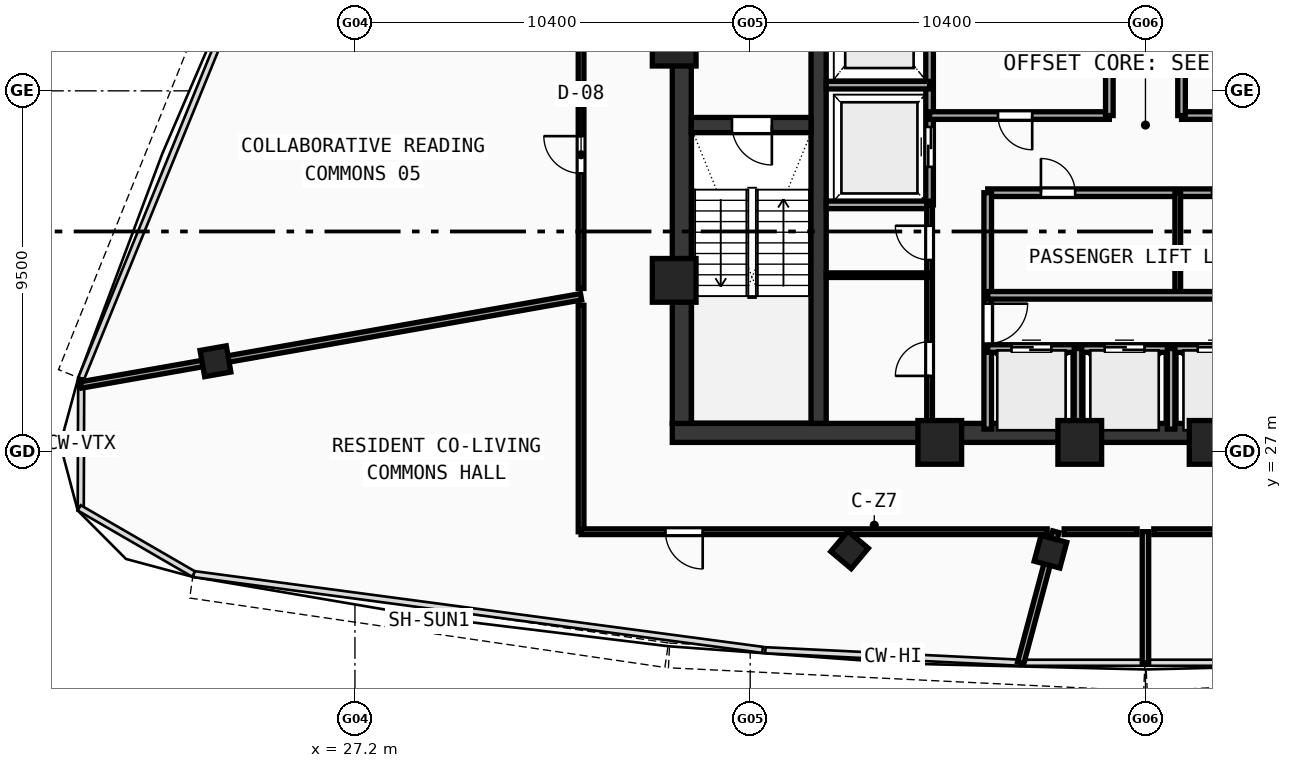
"""IFC4 building model, lengths in metres.
Left out: names, types, materials, properties, quantities, classifications, styles, units other than length and angle.
Written with IfcOpenShell. Run it as: python <this file> out.ifc"""

import sys

from ifc_helpers import new_model, si_unit, direction, frame, frame_2d, origin, origin_with_axes, origin_2d, place, context, subcontext, project, spatial, rectangle, hollow_rectangle, extrude, source, transform, mapped, element, fill, save


model = new_model("IFC4")
c1 = context("Model", 3, precision=1e-05, world=origin(), true_north=direction((0.0, 1.0)))
c2 = subcontext(c1, "Body", "Model", "MODEL_VIEW")
j1 = project(units=[si_unit("LENGTHUNIT", "METRE"), si_unit("PLANEANGLEUNIT", "RADIAN")], contexts=[c1])
p1 = place(None, origin())
s1 = spatial("IfcSite", under=j1, at=p1, CompositionType="ELEMENT")
p2 = place(p1, origin())
s2 = spatial("IfcBuilding", under=s1, at=p2, CompositionType="ELEMENT")
p3 = place(p2, frame((0.0, 0.0, 336.76)))
s3 = spatial("IfcBuildingStorey", under=s2, at=p3, CompositionType="ELEMENT", Elevation=336.76)
p4 = place(p3, frame((35.55, 27.5, 0.0), z_axis=(0.0, 0.0, 1.0), x_axis=(1.0, 0.0, 0.0)))
e1 = element("IfcWall", 1, at=p4, inside=s3, PredefinedType="SHEAR", context=c2, shape_type="SweptSolid", body=[
    extrude(rectangle(XDim=24.9, YDim=0.5, at=frame_2d((12.45, 0.0))), origin(), (0.0, 0.0, 1.0), 3.49),
])
p5 = place(p3, frame((35.8, 27.75, 0.0), z_axis=(0.0, 0.0, 1.0), x_axis=(0.0, 1.0, 0.0)))
e2 = element("IfcWall", 2, at=p5, inside=s3, PredefinedType="SHEAR", context=c2, shape_type="SweptSolid", body=[
    extrude(rectangle(XDim=12.2, YDim=0.5, at=frame_2d((6.1, 0.0))), origin(), (0.0, 0.0, 1.0), 3.49),
])
p6 = place(p3, frame((39.4, 27.75, 0.0), z_axis=(0.0, 0.0, 1.0), x_axis=(0.0, 1.0, 0.0)))
e3 = element("IfcWall", 3, at=p6, inside=s3, PredefinedType="SHEAR", context=c2, shape_type="SweptSolid", body=[
    extrude(rectangle(XDim=12.2, YDim=0.4, at=frame_2d((6.1, 0.0))), origin(), (0.0, 0.0, 1.0), 3.49),
])
p7 = place(p6, frame((10.0, 0.0, 0.0)))
e4 = element("IfcOpeningElement", 4, at=p7, cuts=e3, PredefinedType="OPENING", context=c2, shape_type="SweptSolid", body=[
    extrude(rectangle(XDim=1.1, YDim=2.1, at=frame_2d((0.55, 1.05))), frame((0.0, 0.21, 0.0), z_axis=(0.0, -1.0, 0.0), x_axis=(1.0, 0.0, 0.0)), (0.0, 0.0, 1.0), 0.42),
])
p8 = place(p3, frame((36.05, 35.6, 0.0), z_axis=(0.0, 0.0, 1.0), x_axis=(1.0, 0.0, 0.0)))
e5 = element("IfcWall", 5, at=p8, inside=s3, PredefinedType="SHEAR", context=c2, shape_type="SweptSolid", body=[
    extrude(rectangle(XDim=3.15, YDim=0.4, at=frame_2d((1.575, 0.0))), origin(), (0.0, 0.0, 1.0), 3.49),
])
p9 = place(p8, frame((1.07, 0.0, 0.0)))
e6 = element("IfcOpeningElement", 6, at=p9, cuts=e5, PredefinedType="OPENING", context=c2, shape_type="SweptSolid", body=[
    extrude(rectangle(XDim=1.05, YDim=2.1, at=frame_2d((0.525, 1.05))), frame((0.0, 0.21, 0.0), z_axis=(0.0, -1.0, 0.0), x_axis=(1.0, 0.0, 0.0)), (0.0, 0.0, 1.0), 0.42),
])
m1 = source(origin(), c2, "Body", "SweptSolid", [
    extrude(hollow_rectangle(XDim=1.15, YDim=1.15, WallThickness=0.048, at=origin_2d()), origin(), (0.0, 0.0, 1.0), 3.75),
])
for number, where, z_axis, x_axis in (
    (7, (42.588, 27.25, -0.26), (0.0, 0.0, 1.0), (1.0, 0.0, 0.0)),
    (8, (46.272, 27.25, -0.26), (0.0, 0.0, 1.0), (1.0, 0.0, 0.0)),
    (9, (49.729, 27.25, -0.26), (0.0, 0.0, 1.0), (1.0, 0.0, 0.0)),
    (10, (35.6, 37.729, -0.26), (0.0, 0.0, 1.0), (1.0, 0.0, 0.0)),
    (11, (35.6, 31.513, -0.26), (0.0, 0.0, 1.0), (1.0, 0.0, 0.0)),
):
    element("IfcColumn", number, at=place(p3, frame(where, z_axis=z_axis, x_axis=x_axis)), inside=s3, PredefinedType="COLUMN", context=c2, shape_type="MappedRepresentation", body=[
        mapped(m1, transform((0.0, 0.0, 0.0), scale=1.0)),
    ])
m2 = source(origin(), c2, "Body", "SweptSolid", [
    extrude(hollow_rectangle(XDim=0.7, YDim=0.7, WallThickness=0.026, at=origin_2d()), origin(), (0.0, 0.0, 1.0), 3.75),
])
for number, where, z_axis, x_axis in (
    (12, (40.215, 24.422, -0.26), (0.0, 0.0, 1.0), (0.766, -0.643, 0.0)),
    (13, (45.501, 24.373, -0.26), (0.0, 0.0, 1.0), (0.966, -0.259, 0.0)),
    (14, (23.53, 29.385, -0.26), (0.0, 0.0, 1.0), (0.174, -0.985, 0.0)),
):
    element("IfcColumn", number, at=place(p3, frame(where, z_axis=z_axis, x_axis=x_axis)), inside=s3, PredefinedType="COLUMN", context=c2, shape_type="MappedRepresentation", body=[
        mapped(m2, transform((0.0, 0.0, 0.0), scale=1.0)),
    ])
p10 = place(p3, frame((42.32, 33.5, 0.0), z_axis=(0.0, 0.0, 1.0), x_axis=(0.0, 1.0, 0.0)))
e15 = element("IfcWall", 15, at=p10, inside=s3, PredefinedType="SOLIDWALL", context=c2, shape_type="SweptSolid", body=[
    extrude(rectangle(XDim=6.45, YDim=0.2, at=frame_2d((3.225, 0.0))), origin(), (0.0, 0.0, 1.0), 3.49),
])
p11 = place(p10, frame((1.0, 0.0, 0.0)))
e16 = element("IfcOpeningElement", 16, at=p11, cuts=e15, PredefinedType="OPENING", context=c2, shape_type="SweptSolid", body=[
    extrude(rectangle(XDim=1.05, YDim=2.1, at=frame_2d((0.525, 1.05))), frame((0.0, 0.11, 0.0), z_axis=(0.0, -1.0, 0.0), x_axis=(1.0, 0.0, 0.0)), (0.0, 0.0, 1.0), 0.22),
])
for number, where, z_axis, x_axis in (
    (17, (39.6, 36.65, 0.0), (0.0, 0.0, 1.0), (1.0, 0.0, 0.0)),
    (18, (39.6, 33.5, 0.0), (0.0, 0.0, 1.0), (1.0, 0.0, 0.0)),
):
    element("IfcWall", number, at=place(p3, frame(where, z_axis=z_axis, x_axis=x_axis)), inside=s3, PredefinedType="SOLIDWALL", context=c2, shape_type="SweptSolid", body=[
        extrude(rectangle(XDim=2.72, YDim=0.2, at=frame_2d((1.36, 0.0))), origin(), (0.0, 0.0, 1.0), 3.49),
    ])
p12 = place(p3, frame((42.32, 35.85, 0.0), z_axis=(0.0, 0.0, 1.0), x_axis=(1.0, 0.0, 0.0)))
e19 = element("IfcWall", 19, at=p12, inside=s3, PredefinedType="SOLIDWALL", context=c2, shape_type="SweptSolid", body=[
    extrude(rectangle(XDim=4.73, YDim=0.2, at=frame_2d((2.365, 0.0))), origin(), (0.0, 0.0, 1.0), 3.49),
])
p13 = place(p12, frame((1.8, 0.0, 0.0)))
e20 = element("IfcOpeningElement", 20, at=p13, cuts=e19, PredefinedType="OPENING", context=c2, shape_type="SweptSolid", body=[
    extrude(rectangle(XDim=0.9, YDim=2.1, at=frame_2d((0.45, 1.05))), frame((0.0, 0.11, 0.0), z_axis=(0.0, -1.0, 0.0), x_axis=(1.0, 0.0, 0.0)), (0.0, 0.0, 1.0), 0.22),
])
p14 = place(p3, frame((48.95, 35.85, 0.0), z_axis=(0.0, 0.0, 1.0), x_axis=(1.0, 0.0, 0.0)))
e21 = element("IfcWall", 21, at=p14, inside=s3, PredefinedType="SOLIDWALL", context=c2, shape_type="SweptSolid", body=[
    extrude(rectangle(XDim=4.73, YDim=0.2, at=frame_2d((2.365, 0.0))), origin(), (0.0, 0.0, 1.0), 3.49),
])
p15 = place(p14, frame((1.8, 0.0, 0.0)))
e22 = element("IfcOpeningElement", 22, at=p15, cuts=e21, PredefinedType="OPENING", context=c2, shape_type="SweptSolid", body=[
    extrude(rectangle(XDim=0.9, YDim=2.1, at=frame_2d((0.45, 1.05))), frame((0.0, 0.11, 0.0), z_axis=(0.0, -1.0, 0.0), x_axis=(1.0, 0.0, 0.0)), (0.0, 0.0, 1.0), 0.22),
])
for number, where, z_axis, x_axis in (
    (23, (47.05, 35.85, 0.0), (0.0, 0.0, 1.0), (0.0, 1.0, 0.0)),
    (24, (48.95, 35.85, 0.0), (0.0, 0.0, 1.0), (0.0, 1.0, 0.0)),
):
    element("IfcWall", number, at=place(p3, frame(where, z_axis=z_axis, x_axis=x_axis)), inside=s3, PredefinedType="SOLIDWALL", context=c2, shape_type="SweptSolid", body=[
        extrude(rectangle(XDim=4.1, YDim=0.2, at=frame_2d((2.05, 0.0))), origin(), (0.0, 0.0, 1.0), 3.49),
    ])
p16 = place(p3, frame((43.85, 33.82, 0.0), z_axis=(0.0, 0.0, 1.0), x_axis=(1.0, 0.0, 0.0)))
e25 = element("IfcWall", 25, at=p16, inside=s3, PredefinedType="SOLIDWALL", context=c2, shape_type="SweptSolid", body=[
    extrude(rectangle(XDim=9.83, YDim=0.2, at=frame_2d((4.915, 0.0))), origin(), (0.0, 0.0, 1.0), 3.49),
])
p17 = place(p16, frame((1.4, 0.0, 0.0)))
e26 = element("IfcOpeningElement", 26, at=p17, cuts=e25, PredefinedType="OPENING", context=c2, shape_type="SweptSolid", body=[
    extrude(rectangle(XDim=0.9, YDim=2.1, at=frame_2d((0.45, 1.05))), frame((0.0, 0.11, 0.0), z_axis=(0.0, -1.0, 0.0), x_axis=(1.0, 0.0, 0.0)), (0.0, 0.0, 1.0), 0.22),
])
p18 = place(p16, frame((5.9, 0.0, 0.0)))
e27 = element("IfcOpeningElement", 27, at=p18, cuts=e25, PredefinedType="OPENING", context=c2, shape_type="SweptSolid", body=[
    extrude(rectangle(XDim=0.9, YDim=2.1, at=frame_2d((0.45, 1.05))), frame((0.0, 0.11, 0.0), z_axis=(0.0, -1.0, 0.0), x_axis=(1.0, 0.0, 0.0)), (0.0, 0.0, 1.0), 0.22),
])
p19 = place(p3, frame((43.85, 27.6, 0.0), z_axis=(0.0, 0.0, 1.0), x_axis=(0.0, 1.0, 0.0)))
e28 = element("IfcWall", 28, at=p19, inside=s3, PredefinedType="SOLIDWALL", context=c2, shape_type="SweptSolid", body=[
    extrude(rectangle(XDim=6.22, YDim=0.2, at=frame_2d((3.11, 0.0))), origin(), (0.0, 0.0, 1.0), 3.49),
])
p20 = place(p19, frame((2.25, 0.0, 0.0)))
e29 = element("IfcOpeningElement", 29, at=p20, cuts=e28, PredefinedType="OPENING", context=c2, shape_type="SweptSolid", body=[
    extrude(rectangle(XDim=1.05, YDim=2.1, at=frame_2d((0.525, 1.05))), frame((0.0, 0.11, 0.0), z_axis=(0.0, -1.0, 0.0), x_axis=(1.0, 0.0, 0.0)), (0.0, 0.0, 1.0), 0.22),
])
p21 = place(p3, frame((48.85, 31.12, 0.0), z_axis=(0.0, 0.0, 1.0), x_axis=(0.0, 1.0, 0.0)))
e30 = element("IfcWall", 30, at=p21, inside=s3, PredefinedType="PARTITIONING", context=c2, shape_type="SweptSolid", body=[
    extrude(rectangle(XDim=2.7, YDim=0.15, at=frame_2d((1.35, 0.0))), origin(), (0.0, 0.0, 1.0), 3.49),
])
p22 = place(p3, frame((43.85, 29.72, 0.0), z_axis=(0.0, 0.0, 1.0), x_axis=(1.0, 0.0, 0.0)))
e31 = element("IfcWall", 31, at=p22, inside=s3, PredefinedType="SOLIDWALL", context=c2, shape_type="SweptSolid", body=[
    extrude(rectangle(XDim=7.2, YDim=0.2, at=frame_2d((3.6, 0.0))), origin(), (0.0, 0.0, 1.0), 3.49),
])
p23 = place(p22, frame((0.625, 0.0, 0.0)))
e32 = element("IfcOpeningElement", 32, at=p23, cuts=e31, PredefinedType="OPENING", context=c2, shape_type="SweptSolid", body=[
    extrude(rectangle(XDim=1.05, YDim=2.1, at=frame_2d((0.525, 1.05))), frame((0.0, 0.11, 0.0), z_axis=(0.0, -1.0, 0.0), x_axis=(1.0, 0.0, 0.0)), (0.0, 0.0, 1.0), 0.22),
])
p24 = place(p22, frame((3.075, 0.0, 0.0)))
e33 = element("IfcOpeningElement", 33, at=p24, cuts=e31, PredefinedType="OPENING", context=c2, shape_type="SweptSolid", body=[
    extrude(rectangle(XDim=1.05, YDim=2.1, at=frame_2d((0.525, 1.05))), frame((0.0, 0.11, 0.0), z_axis=(0.0, -1.0, 0.0), x_axis=(1.0, 0.0, 0.0)), (0.0, 0.0, 1.0), 0.22),
])
p25 = place(p22, frame((5.525, 0.0, 0.0)))
e34 = element("IfcOpeningElement", 34, at=p25, cuts=e31, PredefinedType="OPENING", context=c2, shape_type="SweptSolid", body=[
    extrude(rectangle(XDim=1.05, YDim=2.1, at=frame_2d((0.525, 1.05))), frame((0.0, 0.11, 0.0), z_axis=(0.0, -1.0, 0.0), x_axis=(1.0, 0.0, 0.0)), (0.0, 0.0, 1.0), 0.22),
])
p26 = place(p3, frame((43.85, 31.12, 0.0), z_axis=(0.0, 0.0, 1.0), x_axis=(1.0, 0.0, 0.0)))
e35 = element("IfcWall", 35, at=p26, inside=s3, PredefinedType="SOLIDWALL", context=c2, shape_type="SweptSolid", body=[
    extrude(rectangle(XDim=9.83, YDim=0.2, at=frame_2d((4.915, 0.0))), origin(), (0.0, 0.0, 1.0), 3.49),
])
for number, where, z_axis, x_axis in (
    (36, (46.225, 27.6, 0.0), (0.0, 0.0, 1.0), (0.0, 1.0, 0.0)),
    (37, (48.675, 27.6, 0.0), (0.0, 0.0, 1.0), (0.0, 1.0, 0.0)),
):
    element("IfcWall", number, at=place(p3, frame(where, z_axis=z_axis, x_axis=x_axis)), inside=s3, PredefinedType="SOLIDWALL", context=c2, shape_type="SweptSolid", body=[
        extrude(rectangle(XDim=2.12, YDim=0.2, at=frame_2d((1.06, 0.0))), origin(), (0.0, 0.0, 1.0), 3.49),
    ])
p27 = place(p3, frame((42.32, 27.6, 0.0), z_axis=(0.0, 0.0, 1.0), x_axis=(0.0, 1.0, 0.0)))
e38 = element("IfcWall", 38, at=p27, inside=s3, PredefinedType="PARTITIONING", context=c2, shape_type="SweptSolid", body=[
    extrude(rectangle(XDim=5.9, YDim=0.15, at=frame_2d((2.95, 0.0))), origin(), (0.0, 0.0, 1.0), 3.49),
])
p28 = place(p27, frame((1.4, 0.0, 0.0)))
e39 = element("IfcOpeningElement", 39, at=p28, cuts=e38, PredefinedType="OPENING", context=c2, shape_type="SweptSolid", body=[
    extrude(rectangle(XDim=0.9, YDim=2.1, at=frame_2d((0.45, 1.05))), frame((0.0, 0.085, 0.0), z_axis=(0.0, -1.0, 0.0), x_axis=(1.0, 0.0, 0.0)), (0.0, 0.0, 1.0), 0.17),
])
p29 = place(p27, frame((4.45, 0.0, 0.0)))
e40 = element("IfcOpeningElement", 40, at=p29, cuts=e38, PredefinedType="OPENING", context=c2, shape_type="SweptSolid", body=[
    extrude(rectangle(XDim=0.9, YDim=2.1, at=frame_2d((0.45, 1.05))), frame((0.0, 0.085, 0.0), z_axis=(0.0, -1.0, 0.0), x_axis=(1.0, 0.0, 0.0)), (0.0, 0.0, 1.0), 0.17),
])
p30 = place(p3, frame((39.6, 31.65, 0.0), z_axis=(0.0, 0.0, 1.0), x_axis=(1.0, 0.0, 0.0)))
e41 = element("IfcWall", 41, at=p30, inside=s3, PredefinedType="PARTITIONING", context=c2, shape_type="SweptSolid", body=[
    extrude(rectangle(XDim=2.72, YDim=0.12, at=frame_2d((1.36, 0.0))), origin(), (0.0, 0.0, 1.0), 3.49),
])
p31 = place(p3, frame((33.15, 31.082, 0.0), z_axis=(0.0, 0.0, 1.0), x_axis=(-0.984808938627, -0.173641453575, 0.0)))
e42 = element("IfcWall", 42, at=p31, inside=s3, PredefinedType="PARTITIONING", context=c2, shape_type="SweptSolid", body=[
    extrude(rectangle(XDim=13.358, YDim=0.17, at=frame_2d((6.679, 0.0))), origin(), (0.0, 0.0, 1.0), 2.89),
])
p32 = place(p3, frame((45.642, 24.9, 0.0), z_axis=(0.0, 0.0, 1.0), x_axis=(-0.258837518281, -0.965920876227, 0.0)))
e43 = element("IfcWall", 43, at=p32, inside=s3, PredefinedType="PARTITIONING", context=c2, shape_type="SweptSolid", body=[
    extrude(rectangle(XDim=3.569, YDim=0.17, at=frame_2d((1.785, 0.0))), origin(), (0.0, 0.0, 1.0), 2.89),
])
p33 = place(p3, frame((48.0, 24.9, 0.0), z_axis=(0.0, 0.0, 1.0), x_axis=(0.0, -1.0, 0.0)))
e44 = element("IfcWall", 44, at=p33, inside=s3, PredefinedType="PARTITIONING", context=c2, shape_type="SweptSolid", body=[
    extrude(rectangle(XDim=3.448, YDim=0.17, at=frame_2d((1.724, 0.0))), origin(), (0.0, 0.0, 1.0), 2.89),
])
p34 = place(p3, frame((33.15, 24.9, 0.0), z_axis=(0.0, 0.0, 1.0), x_axis=(0.0, 1.0, 0.0)))
e45 = element("IfcWall", 45, at=p34, inside=s3, PredefinedType="PARTITIONING", context=c2, shape_type="SweptSolid", body=[
    extrude(rectangle(XDim=5.958, YDim=0.15, at=frame_2d((2.979, 0.0))), origin(), (0.0, 0.0, 1.0), 2.89),
])
p35 = place(p3, frame((33.15, 31.301, 0.0), z_axis=(0.0, 0.0, 1.0), x_axis=(0.0, 1.0, 0.0)))
e46 = element("IfcWall", 46, at=p35, inside=s3, PredefinedType="PARTITIONING", context=c2, shape_type="SweptSolid", body=[
    extrude(rectangle(XDim=7.004, YDim=0.15, at=frame_2d((3.502, 0.0))), origin(), (0.0, 0.0, 1.0), 3.49),
])
p36 = place(p35, frame((3.027, 0.0, 0.0)))
e47 = element("IfcOpeningElement", 47, at=p36, cuts=e46, PredefinedType="OPENING", context=c2, shape_type="SweptSolid", body=[
    extrude(rectangle(XDim=0.98, YDim=2.12, at=frame_2d((0.49, 1.06))), frame((0.0, 0.085, 0.0), z_axis=(0.0, -1.0, 0.0), x_axis=(1.0, 0.0, 0.0)), (0.0, 0.0, 1.0), 0.17),
])
for number, where, z_axis, x_axis in (
    (48, (50.138, 24.9, 0.0), (0.0, 0.0, 1.0), (-1.0, 0.0, 0.0)),
    (49, (47.78, 24.9, 0.0), (0.0, 0.0, 1.0), (-1.0, 0.0, 0.0)),
):
    element("IfcWall", number, at=place(p3, frame(where, z_axis=z_axis, x_axis=x_axis)), inside=s3, PredefinedType="PARTITIONING", context=c2, shape_type="SweptSolid", body=[
        extrude(rectangle(XDim=1.918, YDim=0.15, at=frame_2d((0.959, 0.0))), origin(), (0.0, 0.0, 1.0), 3.49),
    ])
p37 = place(p3, frame((45.414, 24.9, 0.0), z_axis=(0.0, 0.0, 1.0), x_axis=(-1.0, 0.0, 0.0)))
e50 = element("IfcWall", 50, at=p37, inside=s3, PredefinedType="PARTITIONING", context=c2, shape_type="SweptSolid", body=[
    extrude(rectangle(XDim=12.264, YDim=0.15, at=frame_2d((6.132, 0.0))), origin(), (0.0, 0.0, 1.0), 2.89),
])
p38 = place(p37, frame((9.064, 0.0, 0.0)))
e51 = element("IfcOpeningElement", 51, at=p38, cuts=e50, PredefinedType="OPENING", context=c2, shape_type="SweptSolid", body=[
    extrude(rectangle(XDim=0.98, YDim=2.12, at=frame_2d((0.49, 1.06))), frame((0.0, 0.085, 0.0), z_axis=(0.0, -1.0, 0.0), x_axis=(1.0, 0.0, 0.0)), (0.0, 0.0, 1.0), 0.17),
])
m3 = source(origin(), c2, "Body", "SweptSolid", [
    extrude(rectangle(XDim=1.05, YDim=2.1, at=frame_2d((0.525, 1.05))), frame((0.0, 0.025, 0.0), z_axis=(0.0, -1.0, 0.0), x_axis=(1.0, 0.0, 0.0)), (0.0, 0.0, 1.0), 0.05),
])
p39 = place(p9, frame((1.05, 0.0, 0.0), z_axis=(0.0, 0.0, 1.0), x_axis=(-1.0, 0.0, 0.0)))
e52 = element("IfcDoor", 52, at=p39, inside=s3, OperationType="SINGLE_SWING_LEFT", PredefinedType="DOOR", context=c2, shape_type="MappedRepresentation", body=[
    mapped(m3, transform((0.0, 0.0, 0.0), scale=1.0)),
])
fill(e6, e52)
p40 = place(p11, origin_with_axes())
e53 = element("IfcDoor", 53, at=p40, inside=s3, OperationType="DOUBLE_DOOR_SLIDING", PredefinedType="DOOR", context=c2, shape_type="MappedRepresentation", body=[
    mapped(m3, transform((0.0, 0.0, 0.0), scale=1.0)),
])
fill(e16, e53)
m4 = source(origin(), c2, "Body", "SweptSolid", [
    extrude(rectangle(XDim=0.9, YDim=2.1, at=frame_2d((0.45, 1.05))), frame((0.0, 0.025, 0.0), z_axis=(0.0, -1.0, 0.0), x_axis=(1.0, 0.0, 0.0)), (0.0, 0.0, 1.0), 0.05),
])
p41 = place(p13, frame((0.9, 0.0, 0.0), z_axis=(0.0, 0.0, 1.0), x_axis=(-1.0, 0.0, 0.0)))
e54 = element("IfcDoor", 54, at=p41, inside=s3, OperationType="SINGLE_SWING_LEFT", PredefinedType="DOOR", context=c2, shape_type="MappedRepresentation", body=[
    mapped(m4, transform((0.0, 0.0, 0.0), scale=1.0)),
])
fill(e20, e54)
p42 = place(p17, origin_with_axes())
e55 = element("IfcDoor", 55, at=p42, inside=s3, OperationType="SINGLE_SWING_LEFT", PredefinedType="DOOR", context=c2, shape_type="MappedRepresentation", body=[
    mapped(m4, transform((0.0, 0.0, 0.0), scale=1.0)),
])
fill(e26, e55)
p43 = place(p18, origin_with_axes())
e56 = element("IfcDoor", 56, at=p43, inside=s3, OperationType="SINGLE_SWING_RIGHT", PredefinedType="DOOR", context=c2, shape_type="MappedRepresentation", body=[
    mapped(m4, transform((0.0, 0.0, 0.0), scale=1.0)),
])
fill(e27, e56)
p44 = place(p20, frame((1.05, 0.0, 0.0), z_axis=(0.0, 0.0, 1.0), x_axis=(-1.0, 0.0, 0.0)))
e57 = element("IfcDoor", 57, at=p44, inside=s3, OperationType="SINGLE_SWING_LEFT", PredefinedType="DOOR", context=c2, shape_type="MappedRepresentation", body=[
    mapped(m3, transform((0.0, 0.0, 0.0), scale=1.0)),
])
fill(e29, e57)
p45 = place(p23, origin_with_axes())
e58 = element("IfcDoor", 58, at=p45, inside=s3, OperationType="DOUBLE_DOOR_SLIDING", PredefinedType="DOOR", context=c2, shape_type="MappedRepresentation", body=[
    mapped(m3, transform((0.0, 0.0, 0.0), scale=1.0)),
])
fill(e32, e58)
p46 = place(p24, origin_with_axes())
e59 = element("IfcDoor", 59, at=p46, inside=s3, OperationType="DOUBLE_DOOR_SLIDING", PredefinedType="DOOR", context=c2, shape_type="MappedRepresentation", body=[
    mapped(m3, transform((0.0, 0.0, 0.0), scale=1.0)),
])
fill(e33, e59)
p47 = place(p25, origin_with_axes())
e60 = element("IfcDoor", 60, at=p47, inside=s3, OperationType="DOUBLE_DOOR_SLIDING", PredefinedType="DOOR", context=c2, shape_type="MappedRepresentation", body=[
    mapped(m3, transform((0.0, 0.0, 0.0), scale=1.0)),
])
fill(e34, e60)
p48 = place(p28, origin_with_axes())
e61 = element("IfcDoor", 61, at=p48, inside=s3, OperationType="SINGLE_SWING_LEFT", PredefinedType="DOOR", context=c2, shape_type="MappedRepresentation", body=[
    mapped(m4, transform((0.0, 0.0, 0.0), scale=1.0)),
])
fill(e39, e61)
p49 = place(p29, origin_with_axes())
e62 = element("IfcDoor", 62, at=p49, inside=s3, OperationType="SINGLE_SWING_RIGHT", PredefinedType="DOOR", context=c2, shape_type="MappedRepresentation", body=[
    mapped(m4, transform((0.0, 0.0, 0.0), scale=1.0)),
])
fill(e40, e62)
m5 = source(origin(), c2, "Body", "SweptSolid", [
    extrude(rectangle(XDim=0.98, YDim=2.12, at=frame_2d((0.49, 1.06))), frame((0.0, 0.025, 0.0), z_axis=(0.0, -1.0, 0.0), x_axis=(1.0, 0.0, 0.0)), (0.0, 0.0, 1.0), 0.05),
])
p50 = place(p36, origin_with_axes())
e63 = element("IfcDoor", 63, at=p50, inside=s3, OperationType="SINGLE_SWING_RIGHT", PredefinedType="DOOR", context=c2, shape_type="MappedRepresentation", body=[
    mapped(m5, transform((0.0, 0.0, 0.0), scale=1.0)),
])
fill(e47, e63)
p51 = place(p38, origin_with_axes())
e64 = element("IfcDoor", 64, at=p51, inside=s3, OperationType="SINGLE_SWING_LEFT", PredefinedType="DOOR", context=c2, shape_type="MappedRepresentation", body=[
    mapped(m5, transform((0.0, 0.0, 0.0), scale=1.0)),
])
fill(e51, e64)
save(model, sys.argv[1])
